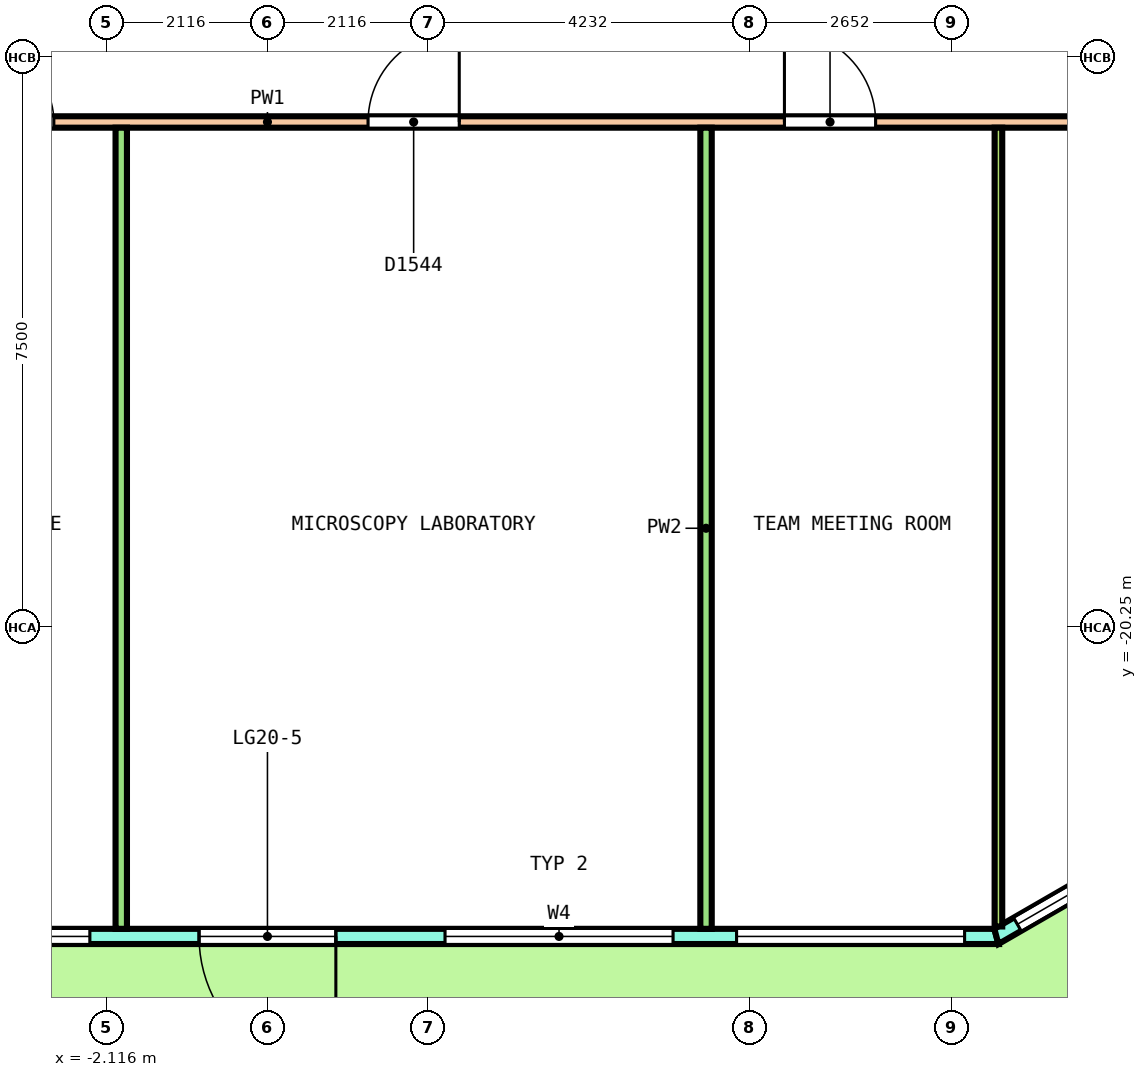
"""IFC4 building model, lengths in metres.
Left out: names, types, materials, properties, quantities, classifications, styles, units other than length and angle.
Written with IfcOpenShell. Run it as: python <this file> out.ifc"""

import sys

from ifc_helpers import new_model, si_unit, direction, frame, frame_2d, origin, place, context, subcontext, project, spatial, polyline, rectangle, outline, extrude, element, fill, save


model = new_model("IFC4")
c1 = context("Model", 3, precision=1e-05, world=origin(), true_north=direction((0.0, 1.0)))
c2 = subcontext(c1, "Body", "Model", "MODEL_VIEW")
j1 = project(units=[si_unit("LENGTHUNIT", "METRE"), si_unit("PLANEANGLEUNIT", "RADIAN")], contexts=[c1])
p1 = place(None, origin())
s1 = spatial("IfcSite", under=j1, at=p1, CompositionType="ELEMENT")
p2 = place(p1, origin())
s2 = spatial("IfcBuilding", under=s1, at=p2, CompositionType="ELEMENT")
p3 = place(p2, frame((0.0, 0.0, 94.0)))
s3 = spatial("IfcBuildingStorey", under=s2, at=p3, CompositionType="ELEMENT", Elevation=94.0)
p4 = place(p3, frame((-9.59, -24.315, 0.0), z_axis=(0.0, 0.0, 1.0), x_axis=(1.0, 0.0, 0.0)))
e1 = element("IfcWall", 1, at=p4, inside=s3, PredefinedType="SOLIDWALL", context=c2, shape_type="SweptSolid", body=[
    extrude(outline(polyline([(-0.027, -0.1), (0.985, -0.1), (1.998, -0.1), (3.01, -0.1), (4.022, -0.1), (5.035, -0.1), (6.047, -0.1), (7.059, -0.1), (8.072, -0.1), (9.084, -0.1), (10.096, -0.1), (11.109, -0.1), (12.121, -0.1), (13.133, -0.1), (14.146, -0.1), (15.158, -0.1), (16.17, -0.1), (17.182, -0.1), (18.195, -0.1), (19.207, -0.1), (19.153, 0.1), (18.147, 0.1), (17.14, 0.1), (16.133, 0.1), (15.127, 0.1), (14.12, 0.1), (13.113, 0.1), (12.107, 0.1), (11.1, 0.1), (10.094, 0.1), (9.087, 0.1), (8.08, 0.1), (7.073, 0.1), (6.067, 0.1), (5.06, 0.1), (4.053, 0.1), (3.047, 0.1), (2.04, 0.1), (1.033, 0.1), (0.027, 0.1), (-0.027, -0.1)])), origin(), (0.0, 0.0, 1.0), 4.1),
])
p5 = place(p4, frame((0.418, 0.0, 0.1)))
e2 = element("IfcOpeningElement", 2, at=p5, cuts=e1, PredefinedType="OPENING", context=c2, shape_type="SweptSolid", body=[
    extrude(rectangle(XDim=3.0, YDim=2.9, at=frame_2d((1.5, 1.45))), frame((0.0, 0.11, 0.0), z_axis=(0.0, -1.0, 0.0), x_axis=(1.0, 0.0, 0.0)), (0.0, 0.0, 1.0), 0.22),
])
p6 = place(p4, frame((4.254, 0.0, 0.1)))
e3 = element("IfcOpeningElement", 3, at=p6, cuts=e1, PredefinedType="OPENING", context=c2, shape_type="SweptSolid", body=[
    extrude(rectangle(XDim=3.0, YDim=2.9, at=frame_2d((1.5, 1.45))), frame((0.0, 0.11, 0.0), z_axis=(0.0, -1.0, 0.0), x_axis=(1.0, 0.0, 0.0)), (0.0, 0.0, 1.0), 0.22),
])
p7 = place(p4, frame((8.69, 0.0, 0.0)))
e4 = element("IfcOpeningElement", 4, at=p7, cuts=e1, PredefinedType="OPENING", context=c2, shape_type="SweptSolid", body=[
    extrude(rectangle(XDim=1.8, YDim=2.4, at=frame_2d((0.9, 1.2))), frame((0.0, 0.11, 0.0), z_axis=(0.0, -1.0, 0.0), x_axis=(1.0, 0.0, 0.0)), (0.0, 0.0, 1.0), 0.22),
])
p8 = place(p4, frame((8.69, 0.0, 2.55)))
e5 = element("IfcOpeningElement", 5, at=p8, cuts=e1, PredefinedType="OPENING", context=c2, shape_type="SweptSolid", body=[
    extrude(rectangle(XDim=1.8, YDim=0.45, at=frame_2d((0.9, 0.225))), frame((0.0, 0.11, 0.0), z_axis=(0.0, -1.0, 0.0), x_axis=(1.0, 0.0, 0.0)), (0.0, 0.0, 1.0), 0.22),
])
p9 = place(p4, frame((11.926, 0.0, 0.1)))
e6 = element("IfcOpeningElement", 6, at=p9, cuts=e1, PredefinedType="OPENING", context=c2, shape_type="SweptSolid", body=[
    extrude(rectangle(XDim=3.0, YDim=2.9, at=frame_2d((1.5, 1.45))), frame((0.0, 0.11, 0.0), z_axis=(0.0, -1.0, 0.0), x_axis=(1.0, 0.0, 0.0)), (0.0, 0.0, 1.0), 0.22),
])
p10 = place(p4, frame((15.762, 0.0, 0.1)))
e7 = element("IfcOpeningElement", 7, at=p10, cuts=e1, PredefinedType="OPENING", context=c2, shape_type="SweptSolid", body=[
    extrude(rectangle(XDim=3.0, YDim=2.9, at=frame_2d((1.5, 1.45))), frame((0.0, 0.11, 0.0), z_axis=(0.0, -1.0, 0.0), x_axis=(1.0, 0.0, 0.0)), (0.0, 0.0, 1.0), 0.22),
])
p11 = place(p3, frame((9.59, -24.315, 0.0), z_axis=(0.0, 0.0, 1.0), x_axis=(0.866029458321, 0.49999297727, 0.0)))
e8 = element("IfcWall", 8, at=p11, inside=s3, PredefinedType="SOLIDWALL", context=c2, shape_type="SweptSolid", body=[
    extrude(outline(polyline([(-0.027, -0.1), (1.128, -0.1), (2.282, -0.1), (3.437, -0.1), (4.592, -0.1), (5.747, -0.1), (6.901, -0.1), (6.848, 0.1), (5.711, 0.1), (4.574, 0.1), (3.437, 0.1), (2.301, 0.1), (1.164, 0.1), (0.027, 0.1), (-0.027, -0.1)])), origin(), (0.0, 0.0, 1.0), 4.1),
])
p12 = place(p11, frame((0.319, 0.0, 0.1)))
e9 = element("IfcOpeningElement", 9, at=p12, cuts=e8, PredefinedType="OPENING", context=c2, shape_type="SweptSolid", body=[
    extrude(rectangle(XDim=2.8, YDim=2.9, at=frame_2d((1.4, 1.45))), frame((0.0, 0.11, 0.0), z_axis=(0.0, -1.0, 0.0), x_axis=(1.0, 0.0, 0.0)), (0.0, 0.0, 1.0), 0.22),
])
p13 = place(p11, frame((3.756, 0.0, 0.1)))
e10 = element("IfcOpeningElement", 10, at=p13, cuts=e8, PredefinedType="OPENING", context=c2, shape_type="SweptSolid", body=[
    extrude(rectangle(XDim=2.8, YDim=2.9, at=frame_2d((1.4, 1.45))), frame((0.0, 0.11, 0.0), z_axis=(0.0, -1.0, 0.0), x_axis=(1.0, 0.0, 0.0)), (0.0, 0.0, 1.0), 0.22),
])
p14 = place(p3, frame((-15.95, -13.6, 0.0), z_axis=(0.0, 0.0, 1.0), x_axis=(1.0, 0.0, 0.0)))
e11 = element("IfcWall", 11, at=p14, inside=s3, PredefinedType="PARTITIONING", context=c2, shape_type="SweptSolid", body=[
    extrude(rectangle(XDim=31.9, YDim=0.15, at=frame_2d((15.95, 0.0))), origin(), (0.0, 0.0, 1.0), 3.05),
])
p15 = place(p14, frame((1.658, 0.0, 0.0)))
e12 = element("IfcOpeningElement", 12, at=p15, cuts=e11, PredefinedType="OPENING", context=c2, shape_type="SweptSolid", body=[
    extrude(rectangle(XDim=1.0, YDim=2.1, at=frame_2d((0.5, 1.05))), frame((0.0, 0.085, 0.0), z_axis=(0.0, -1.0, 0.0), x_axis=(1.0, 0.0, 0.0)), (0.0, 0.0, 1.0), 0.17),
])
p16 = place(p14, frame((7.543, 0.0, 0.0)))
e13 = element("IfcOpeningElement", 13, at=p16, cuts=e11, PredefinedType="OPENING", context=c2, shape_type="SweptSolid", body=[
    extrude(rectangle(XDim=1.0, YDim=2.1, at=frame_2d((0.5, 1.05))), frame((0.0, 0.085, 0.0), z_axis=(0.0, -1.0, 0.0), x_axis=(1.0, 0.0, 0.0)), (0.0, 0.0, 1.0), 0.17),
])
p17 = place(p14, frame((12.14, 0.0, 0.0)))
e14 = element("IfcOpeningElement", 14, at=p17, cuts=e11, PredefinedType="OPENING", context=c2, shape_type="SweptSolid", body=[
    extrude(rectangle(XDim=1.0, YDim=2.1, at=frame_2d((0.5, 1.05))), frame((0.0, 0.085, 0.0), z_axis=(0.0, -1.0, 0.0), x_axis=(1.0, 0.0, 0.0)), (0.0, 0.0, 1.0), 0.17),
])
p18 = place(p14, frame((17.273, 0.0, 0.0)))
e15 = element("IfcOpeningElement", 15, at=p18, cuts=e11, PredefinedType="OPENING", context=c2, shape_type="SweptSolid", body=[
    extrude(rectangle(XDim=1.2, YDim=2.1, at=frame_2d((0.6, 1.05))), frame((0.0, 0.085, 0.0), z_axis=(0.0, -1.0, 0.0), x_axis=(1.0, 0.0, 0.0)), (0.0, 0.0, 1.0), 0.17),
])
p19 = place(p14, frame((22.751, 0.0, 0.0)))
e16 = element("IfcOpeningElement", 16, at=p19, cuts=e11, PredefinedType="OPENING", context=c2, shape_type="SweptSolid", body=[
    extrude(rectangle(XDim=1.2, YDim=2.1, at=frame_2d((0.6, 1.05))), frame((0.0, 0.085, 0.0), z_axis=(0.0, -1.0, 0.0), x_axis=(1.0, 0.0, 0.0)), (0.0, 0.0, 1.0), 0.17),
])
p20 = place(p14, frame((27.967, 0.0, 0.0)))
e17 = element("IfcOpeningElement", 17, at=p20, cuts=e11, PredefinedType="OPENING", context=c2, shape_type="SweptSolid", body=[
    extrude(rectangle(XDim=1.2, YDim=2.1, at=frame_2d((0.6, 1.05))), frame((0.0, 0.085, 0.0), z_axis=(0.0, -1.0, 0.0), x_axis=(1.0, 0.0, 0.0)), (0.0, 0.0, 1.0), 0.17),
])
for number, where, z_axis, x_axis in (
    (18, (-1.923, -24.215, 0.0), (0.0, 0.0, 1.0), (0.0, 1.0, 0.0)),
    (19, (5.77, -24.215, 0.0), (0.0, 0.0, 1.0), (0.0, 1.0, 0.0)),
):
    element("IfcWall", number, at=place(p3, frame(where, z_axis=z_axis, x_axis=x_axis)), inside=s3, PredefinedType="PARTITIONING", context=c2, shape_type="SweptSolid", body=[
        extrude(rectangle(XDim=10.54, YDim=0.15, at=frame_2d((5.27, 0.0))), origin(), (0.0, 0.0, 1.0), 3.05),
    ])
p21 = place(p3, frame((9.617, -24.184, 0.0), z_axis=(0.0, 0.0, 1.0), x_axis=(0.0, 1.0, 0.0)))
e20 = element("IfcWall", 20, at=p21, inside=s3, PredefinedType="PARTITIONING", context=c2, shape_type="SweptSolid", body=[
    extrude(rectangle(XDim=10.509, YDim=0.1, at=frame_2d((5.254, 0.0))), origin(), (0.0, 0.0, 1.0), 3.05),
])
p22 = place(p6, origin())
e21 = element("IfcWindow", 21, at=p22, inside=s3, PartitioningType="SINGLE_PANEL", PredefinedType="WINDOW", context=c2, shape_type="SweptSolid", body=[
    extrude(rectangle(XDim=3.0, YDim=2.9, at=frame_2d((1.5, 1.45))), frame((0.0, 0.03, 0.0), z_axis=(0.0, -1.0, 0.0), x_axis=(1.0, 0.0, 0.0)), (0.0, 0.0, 1.0), 0.06),
])
fill(e3, e21)
p23 = place(p7, origin())
e22 = element("IfcDoor", 22, at=p23, inside=s3, OperationType="DOUBLE_DOOR_SINGLE_SWING", PredefinedType="DOOR", context=c2, shape_type="SweptSolid", body=[
    extrude(rectangle(XDim=1.8, YDim=2.4, at=frame_2d((0.9, 1.2))), frame((0.0, 0.025, 0.0), z_axis=(0.0, -1.0, 0.0), x_axis=(1.0, 0.0, 0.0)), (0.0, 0.0, 1.0), 0.05),
])
fill(e4, e22)
p24 = place(p8, origin())
e23 = element("IfcWindow", 23, at=p24, inside=s3, PartitioningType="SINGLE_PANEL", PredefinedType="WINDOW", context=c2, shape_type="SweptSolid", body=[
    extrude(rectangle(XDim=1.8, YDim=0.45, at=frame_2d((0.9, 0.225))), frame((0.0, 0.03, 0.0), z_axis=(0.0, -1.0, 0.0), x_axis=(1.0, 0.0, 0.0)), (0.0, 0.0, 1.0), 0.06),
])
fill(e5, e23)
p25 = place(p9, origin())
e24 = element("IfcWindow", 24, at=p25, inside=s3, PartitioningType="SINGLE_PANEL", PredefinedType="WINDOW", context=c2, shape_type="SweptSolid", body=[
    extrude(rectangle(XDim=3.0, YDim=2.9, at=frame_2d((1.5, 1.45))), frame((0.0, 0.03, 0.0), z_axis=(0.0, -1.0, 0.0), x_axis=(1.0, 0.0, 0.0)), (0.0, 0.0, 1.0), 0.06),
])
fill(e6, e24)
p26 = place(p10, origin())
e25 = element("IfcWindow", 25, at=p26, inside=s3, PartitioningType="SINGLE_PANEL", PredefinedType="WINDOW", context=c2, shape_type="SweptSolid", body=[
    extrude(rectangle(XDim=3.0, YDim=2.9, at=frame_2d((1.5, 1.45))), frame((0.0, 0.03, 0.0), z_axis=(0.0, -1.0, 0.0), x_axis=(1.0, 0.0, 0.0)), (0.0, 0.0, 1.0), 0.06),
])
fill(e7, e25)
p27 = place(p12, origin())
e26 = element("IfcWindow", 26, at=p27, inside=s3, PartitioningType="SINGLE_PANEL", PredefinedType="WINDOW", context=c2, shape_type="SweptSolid", body=[
    extrude(rectangle(XDim=2.8, YDim=2.9, at=frame_2d((1.4, 1.45))), frame((0.0, 0.03, 0.0), z_axis=(0.0, -1.0, 0.0), x_axis=(1.0, 0.0, 0.0)), (0.0, 0.0, 1.0), 0.06),
])
fill(e9, e26)
p28 = place(p17, origin())
e27 = element("IfcDoor", 27, at=p28, inside=s3, OperationType="SINGLE_SWING_RIGHT", PredefinedType="DOOR", context=c2, shape_type="SweptSolid", body=[
    extrude(rectangle(XDim=1.0, YDim=2.1, at=frame_2d((0.5, 1.05))), frame((0.0, 0.025, 0.0), z_axis=(0.0, -1.0, 0.0), x_axis=(1.0, 0.0, 0.0)), (0.0, 0.0, 1.0), 0.05),
])
fill(e14, e27)
p29 = place(p18, origin())
e28 = element("IfcDoor", 28, at=p29, inside=s3, OperationType="DOUBLE_DOOR_SINGLE_SWING", PredefinedType="DOOR", context=c2, shape_type="SweptSolid", body=[
    extrude(rectangle(XDim=1.2, YDim=2.1, at=frame_2d((0.6, 1.05))), frame((0.0, 0.025, 0.0), z_axis=(0.0, -1.0, 0.0), x_axis=(1.0, 0.0, 0.0)), (0.0, 0.0, 1.0), 0.05),
])
fill(e15, e28)
p30 = place(p19, origin())
e29 = element("IfcDoor", 29, at=p30, inside=s3, OperationType="DOUBLE_DOOR_SINGLE_SWING", PredefinedType="DOOR", context=c2, shape_type="SweptSolid", body=[
    extrude(rectangle(XDim=1.2, YDim=2.1, at=frame_2d((0.6, 1.05))), frame((0.0, 0.025, 0.0), z_axis=(0.0, -1.0, 0.0), x_axis=(1.0, 0.0, 0.0)), (0.0, 0.0, 1.0), 0.05),
])
fill(e16, e29)
save(model, sys.argv[1])
